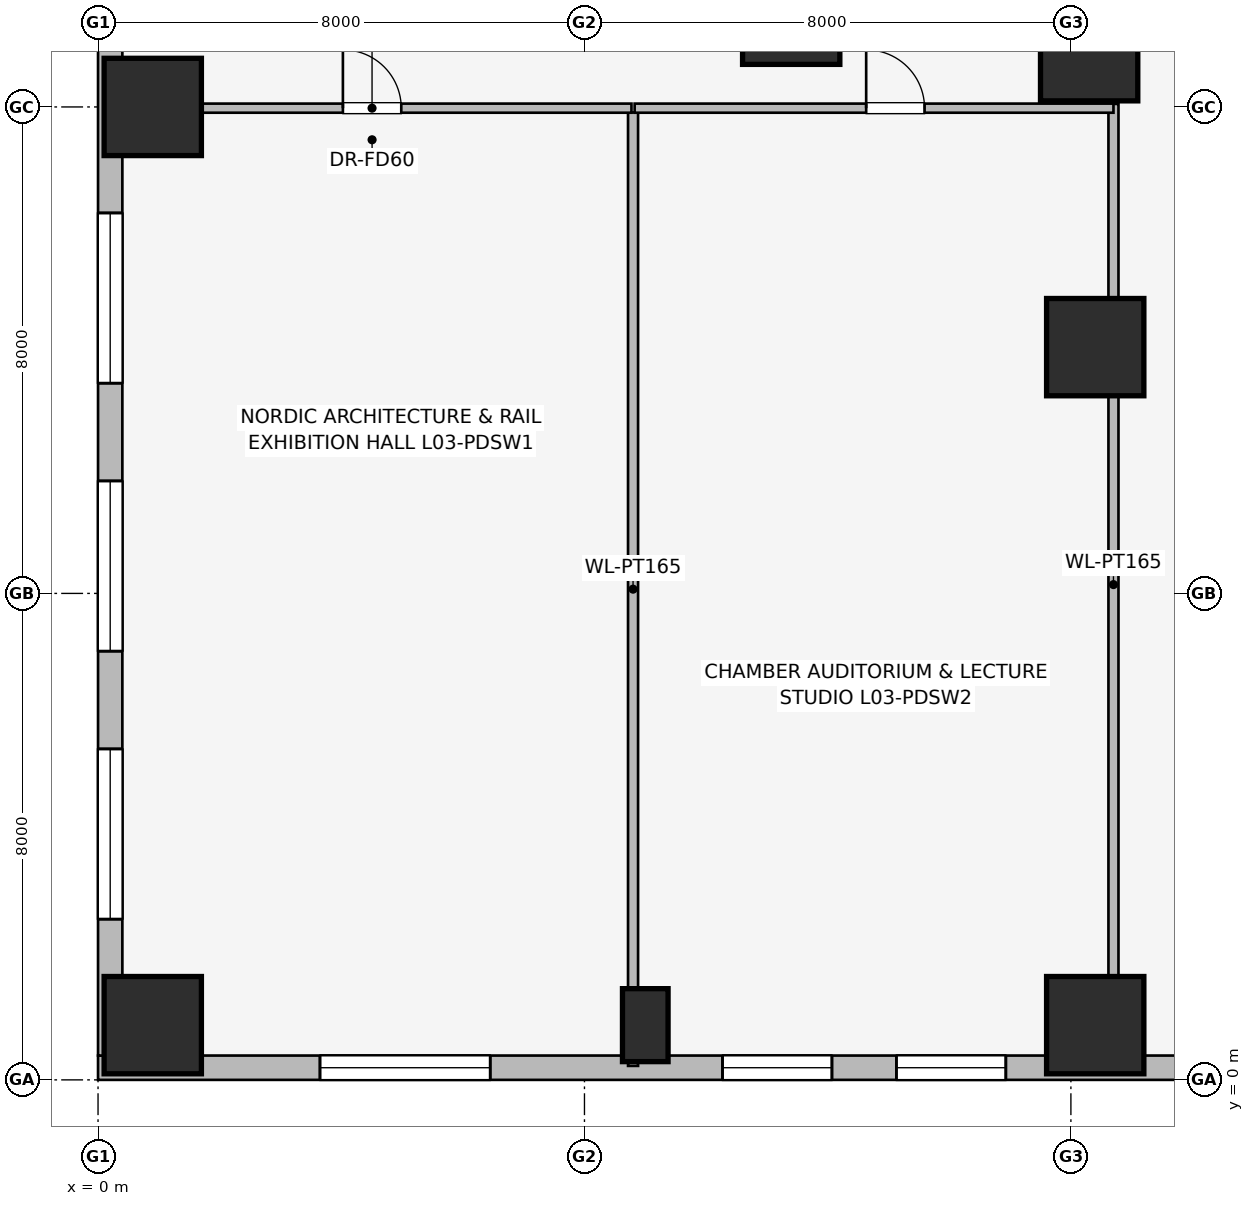
"""IFC4 building model, lengths in metres.
Left out: names, types, materials, properties, quantities, classifications, styles, units other than length and angle.
Written with IfcOpenShell. Run it as: python <this file> out.ifc"""

import sys

from ifc_helpers import new_model, si_unit, direction, frame, frame_2d, origin, origin_2d, place, context, subcontext, project, spatial, rectangle, extrude, element, fill, save


model = new_model("IFC4")
c1 = context("Model", 3, precision=1e-05, world=origin(), true_north=direction((0.0, 1.0)))
c2 = subcontext(c1, "Body", "Model", "MODEL_VIEW")
j1 = project(units=[si_unit("LENGTHUNIT", "METRE"), si_unit("PLANEANGLEUNIT", "RADIAN")], contexts=[c1])
p1 = place(None, origin())
s1 = spatial("IfcSite", under=j1, at=p1, CompositionType="ELEMENT")
p2 = place(p1, origin())
s2 = spatial("IfcBuilding", under=s1, at=p2, CompositionType="ELEMENT")
p3 = place(p2, frame((0.0, 0.0, 11.0)))
s3 = spatial("IfcBuildingStorey", under=s2, at=p3, CompositionType="ELEMENT", Elevation=11.0)
for number, where, z_axis, x_axis in (
    (1, (16.3, 16.9, 0.0), (0.0, 0.0, 1.0), (1.0, 0.0, 0.0)),
    (2, (0.9, 0.9, 0.0), (0.0, 0.0, 1.0), (1.0, 0.0, 0.0)),
    (3, (16.4, 0.9, 0.0), (0.0, 0.0, 1.0), (1.0, 0.0, 0.0)),
    (4, (0.9, 16.0, 0.0), (0.0, 0.0, 1.0), (1.0, 0.0, 0.0)),
    (5, (11.4, 17.5, 0.0), (0.0, 0.0, 1.0), (1.0, 0.0, 0.0)),
    (6, (16.4, 12.05, 0.0), (0.0, 0.0, 1.0), (1.0, 0.0, 0.0)),
):
    element("IfcColumn", number, at=place(p3, frame(where, z_axis=z_axis, x_axis=x_axis)), inside=s3, PredefinedType="COLUMN", context=c2, shape_type="SweptSolid", body=[
        extrude(rectangle(XDim=1.6, YDim=1.6, at=origin_2d()), origin(), (0.0, 0.0, 1.0), 5.0),
    ])
p4 = place(p3, frame((9.0, 0.9, 0.0), z_axis=(0.0, 0.0, 1.0), x_axis=(1.0, 0.0, 0.0)))
e7 = element("IfcColumn", 7, at=p4, inside=s3, PredefinedType="PILASTER", context=c2, shape_type="SweptSolid", body=[
    extrude(rectangle(XDim=0.75, YDim=1.2, at=origin_2d()), origin(), (0.0, 0.0, 1.0), 5.0),
])
p5 = place(p3, frame((24.0, 0.2, 0.0), z_axis=(0.0, 0.0, 1.0), x_axis=(-1.0, 0.0, 0.0)))
e8 = element("IfcWall", 8, at=p5, inside=s3, PredefinedType="STANDARD", context=c2, shape_type="SweptSolid", body=[
    extrude(rectangle(XDim=24.0, YDim=0.4, at=frame_2d((12.0, 0.0))), origin(), (0.0, 0.0, 1.0), 4.69),
])
p6 = place(p5, frame((2.205, 0.0, 0.75)))
e9 = element("IfcOpeningElement", 9, at=p6, cuts=e8, PredefinedType="OPENING", context=c2, shape_type="SweptSolid", body=[
    extrude(rectangle(XDim=2.8, YDim=1.8, at=frame_2d((1.4, 0.9))), frame((0.0, 0.21, 0.0), z_axis=(0.0, -1.0, 0.0), x_axis=(1.0, 0.0, 0.0)), (0.0, 0.0, 1.0), 0.42),
])
p7 = place(p5, frame((9.07, 0.0, 0.75)))
e10 = element("IfcOpeningElement", 10, at=p7, cuts=e8, PredefinedType="OPENING", context=c2, shape_type="SweptSolid", body=[
    extrude(rectangle(XDim=1.8, YDim=1.5, at=frame_2d((0.9, 0.75))), frame((0.0, 0.21, 0.0), z_axis=(0.0, -1.0, 0.0), x_axis=(1.0, 0.0, 0.0)), (0.0, 0.0, 1.0), 0.42),
])
p8 = place(p5, frame((11.93, 0.0, 0.75)))
e11 = element("IfcOpeningElement", 11, at=p8, cuts=e8, PredefinedType="OPENING", context=c2, shape_type="SweptSolid", body=[
    extrude(rectangle(XDim=1.8, YDim=1.5, at=frame_2d((0.9, 0.75))), frame((0.0, 0.21, 0.0), z_axis=(0.0, -1.0, 0.0), x_axis=(1.0, 0.0, 0.0)), (0.0, 0.0, 1.0), 0.42),
])
p9 = place(p5, frame((17.55, 0.0, 0.75)))
e12 = element("IfcOpeningElement", 12, at=p9, cuts=e8, PredefinedType="OPENING", context=c2, shape_type="SweptSolid", body=[
    extrude(rectangle(XDim=2.8, YDim=1.8, at=frame_2d((1.4, 0.9))), frame((0.0, 0.21, 0.0), z_axis=(0.0, -1.0, 0.0), x_axis=(1.0, 0.0, 0.0)), (0.0, 0.0, 1.0), 0.42),
])
p10 = place(p3, frame((0.2, 0.4, 0.0), z_axis=(0.0, 0.0, 1.0), x_axis=(0.0, 1.0, 0.0)))
e13 = element("IfcWall", 13, at=p10, inside=s3, PredefinedType="STANDARD", context=c2, shape_type="SweptSolid", body=[
    extrude(rectangle(XDim=16.6, YDim=0.4, at=frame_2d((8.3, 0.0))), origin(), (0.0, 0.0, 1.0), 4.69),
])
p11 = place(p10, frame((2.243, 0.0, 0.75)))
e14 = element("IfcOpeningElement", 14, at=p11, cuts=e13, PredefinedType="OPENING", context=c2, shape_type="SweptSolid", body=[
    extrude(rectangle(XDim=2.8, YDim=1.8, at=frame_2d((1.4, 0.9))), frame((0.0, 0.21, 0.0), z_axis=(0.0, -1.0, 0.0), x_axis=(1.0, 0.0, 0.0)), (0.0, 0.0, 1.0), 0.42),
])
p12 = place(p10, frame((6.65, 0.0, 0.75)))
e15 = element("IfcOpeningElement", 15, at=p12, cuts=e13, PredefinedType="OPENING", context=c2, shape_type="SweptSolid", body=[
    extrude(rectangle(XDim=2.8, YDim=1.8, at=frame_2d((1.4, 0.9))), frame((0.0, 0.21, 0.0), z_axis=(0.0, -1.0, 0.0), x_axis=(1.0, 0.0, 0.0)), (0.0, 0.0, 1.0), 0.42),
])
p13 = place(p10, frame((11.057, 0.0, 0.75)))
e16 = element("IfcOpeningElement", 16, at=p13, cuts=e13, PredefinedType="OPENING", context=c2, shape_type="SweptSolid", body=[
    extrude(rectangle(XDim=2.8, YDim=1.8, at=frame_2d((1.4, 0.9))), frame((0.0, 0.21, 0.0), z_axis=(0.0, -1.0, 0.0), x_axis=(1.0, 0.0, 0.0)), (0.0, 0.0, 1.0), 0.42),
])
p14 = place(p3, frame((16.7, 0.24, 0.0), z_axis=(0.0, 0.0, 1.0), x_axis=(0.0, 1.0, 0.0)))
e17 = element("IfcWall", 17, at=p14, inside=s3, PredefinedType="PARTITIONING", context=c2, shape_type="SweptSolid", body=[
    extrude(rectangle(XDim=15.81, YDim=0.165, at=frame_2d((7.905, 0.0))), origin(), (0.0, 0.0, 1.0), 3.763),
])
p15 = place(p3, frame((8.799, 0.23, 0.0), z_axis=(0.0, 0.0, 1.0), x_axis=(0.0, 1.0, 0.0)))
e18 = element("IfcWall", 18, at=p15, inside=s3, PredefinedType="PARTITIONING", context=c2, shape_type="SweptSolid", body=[
    extrude(rectangle(XDim=15.68, YDim=0.165, at=frame_2d((7.84, 0.0))), origin(), (0.0, 0.0, 1.0), 4.69),
])
p16 = place(p3, frame((0.24, 15.98, 0.0), z_axis=(0.0, 0.0, 1.0), x_axis=(1.0, 0.0, 0.0)))
e19 = element("IfcWall", 19, at=p16, inside=s3, PredefinedType="PARTITIONING", context=c2, shape_type="SweptSolid", body=[
    extrude(rectangle(XDim=8.533, YDim=0.15, at=frame_2d((4.267, 0.0))), origin(), (0.0, 0.0, 1.0), 3.742),
])
p17 = place(p16, frame((3.787, 0.0, 0.0)))
e20 = element("IfcOpeningElement", 20, at=p17, cuts=e19, PredefinedType="OPENING", context=c2, shape_type="SweptSolid", body=[
    extrude(rectangle(XDim=0.96, YDim=2.0, at=frame_2d((0.48, 1.0))), frame((0.0, 0.085, 0.0), z_axis=(0.0, -1.0, 0.0), x_axis=(1.0, 0.0, 0.0)), (0.0, 0.0, 1.0), 0.17),
])
p18 = place(p3, frame((8.825, 15.98, 0.0), z_axis=(0.0, 0.0, 1.0), x_axis=(1.0, 0.0, 0.0)))
e21 = element("IfcWall", 21, at=p18, inside=s3, PredefinedType="PARTITIONING", context=c2, shape_type="SweptSolid", body=[
    extrude(rectangle(XDim=7.875, YDim=0.15, at=frame_2d((3.938, 0.0))), origin(), (0.0, 0.0, 1.0), 4.69),
])
p19 = place(p18, frame((3.808, 0.0, 0.0)))
e22 = element("IfcOpeningElement", 22, at=p19, cuts=e21, PredefinedType="OPENING", context=c2, shape_type="SweptSolid", body=[
    extrude(rectangle(XDim=0.96, YDim=2.0, at=frame_2d((0.48, 1.0))), frame((0.0, 0.085, 0.0), z_axis=(0.0, -1.0, 0.0), x_axis=(1.0, 0.0, 0.0)), (0.0, 0.0, 1.0), 0.17),
])
p20 = place(p7, origin())
e23 = element("IfcWindow", 23, at=p20, inside=s3, PartitioningType="SINGLE_PANEL", PredefinedType="WINDOW", context=c2, shape_type="SweptSolid", body=[
    extrude(rectangle(XDim=1.8, YDim=1.5, at=frame_2d((0.9, 0.75))), frame((0.0, 0.03, 0.0), z_axis=(0.0, -1.0, 0.0), x_axis=(1.0, 0.0, 0.0)), (0.0, 0.0, 1.0), 0.06),
])
fill(e10, e23)
p21 = place(p8, origin())
e24 = element("IfcWindow", 24, at=p21, inside=s3, PartitioningType="SINGLE_PANEL", PredefinedType="WINDOW", context=c2, shape_type="SweptSolid", body=[
    extrude(rectangle(XDim=1.8, YDim=1.5, at=frame_2d((0.9, 0.75))), frame((0.0, 0.03, 0.0), z_axis=(0.0, -1.0, 0.0), x_axis=(1.0, 0.0, 0.0)), (0.0, 0.0, 1.0), 0.06),
])
fill(e11, e24)
p22 = place(p9, origin())
e25 = element("IfcWindow", 25, at=p22, inside=s3, PartitioningType="SINGLE_PANEL", PredefinedType="WINDOW", context=c2, shape_type="SweptSolid", body=[
    extrude(rectangle(XDim=2.8, YDim=1.8, at=frame_2d((1.4, 0.9))), frame((0.0, 0.03, 0.0), z_axis=(0.0, -1.0, 0.0), x_axis=(1.0, 0.0, 0.0)), (0.0, 0.0, 1.0), 0.06),
])
fill(e12, e25)
p23 = place(p11, origin())
e26 = element("IfcWindow", 26, at=p23, inside=s3, PartitioningType="SINGLE_PANEL", PredefinedType="WINDOW", context=c2, shape_type="SweptSolid", body=[
    extrude(rectangle(XDim=2.8, YDim=1.8, at=frame_2d((1.4, 0.9))), frame((0.0, 0.03, 0.0), z_axis=(0.0, -1.0, 0.0), x_axis=(1.0, 0.0, 0.0)), (0.0, 0.0, 1.0), 0.06),
])
fill(e14, e26)
p24 = place(p12, origin())
e27 = element("IfcWindow", 27, at=p24, inside=s3, PartitioningType="SINGLE_PANEL", PredefinedType="WINDOW", context=c2, shape_type="SweptSolid", body=[
    extrude(rectangle(XDim=2.8, YDim=1.8, at=frame_2d((1.4, 0.9))), frame((0.0, 0.03, 0.0), z_axis=(0.0, -1.0, 0.0), x_axis=(1.0, 0.0, 0.0)), (0.0, 0.0, 1.0), 0.06),
])
fill(e15, e27)
p25 = place(p13, origin())
e28 = element("IfcWindow", 28, at=p25, inside=s3, PartitioningType="SINGLE_PANEL", PredefinedType="WINDOW", context=c2, shape_type="SweptSolid", body=[
    extrude(rectangle(XDim=2.8, YDim=1.8, at=frame_2d((1.4, 0.9))), frame((0.0, 0.03, 0.0), z_axis=(0.0, -1.0, 0.0), x_axis=(1.0, 0.0, 0.0)), (0.0, 0.0, 1.0), 0.06),
])
fill(e16, e28)
p26 = place(p17, origin())
e29 = element("IfcDoor", 29, at=p26, inside=s3, OperationType="SINGLE_SWING_LEFT", PredefinedType="DOOR", context=c2, shape_type="SweptSolid", body=[
    extrude(rectangle(XDim=0.96, YDim=2.0, at=frame_2d((0.48, 1.0))), frame((0.0, 0.025, 0.0), z_axis=(0.0, -1.0, 0.0), x_axis=(1.0, 0.0, 0.0)), (0.0, 0.0, 1.0), 0.05),
])
fill(e20, e29)
p27 = place(p19, origin())
e30 = element("IfcDoor", 30, at=p27, inside=s3, OperationType="SINGLE_SWING_LEFT", PredefinedType="DOOR", context=c2, shape_type="SweptSolid", body=[
    extrude(rectangle(XDim=0.96, YDim=2.0, at=frame_2d((0.48, 1.0))), frame((0.0, 0.025, 0.0), z_axis=(0.0, -1.0, 0.0), x_axis=(1.0, 0.0, 0.0)), (0.0, 0.0, 1.0), 0.05),
])
fill(e22, e30)
save(model, sys.argv[1])
